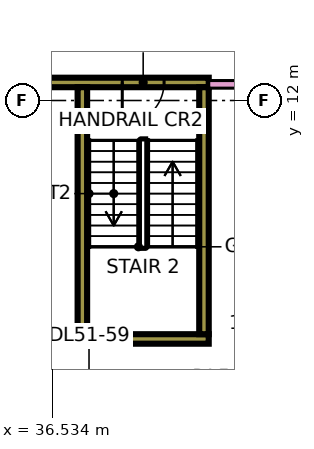
"""IFC4 building model, lengths in metres.
Left out: names, types, materials, properties, quantities, classifications, styles, units other than length and angle.
Written with IfcOpenShell. Run it as: python <this file> out.ifc"""

import sys

from ifc_helpers import new_model, si_unit, direction, frame, frame_2d, origin, place, context, subcontext, project, spatial, rectangle, extrude, element, fill, save


model = new_model("IFC4")
c1 = context("Model", 3, precision=1e-05, world=origin(), true_north=direction((0.0, 1.0)))
c2 = subcontext(c1, "Body", "Model", "MODEL_VIEW")
j1 = project(units=[si_unit("LENGTHUNIT", "METRE"), si_unit("PLANEANGLEUNIT", "RADIAN")], contexts=[c1])
p1 = place(None, origin())
s1 = spatial("IfcSite", under=j1, at=p1, CompositionType="ELEMENT")
p2 = place(p1, origin())
s2 = spatial("IfcBuilding", under=s1, at=p2, CompositionType="ELEMENT")
p3 = place(p2, frame((0.0, 0.0, 219.15)))
s3 = spatial("IfcBuildingStorey", under=s2, at=p3, CompositionType="ELEMENT", Elevation=219.15)
p4 = place(p3, frame((37.2, 5.725, 0.0), z_axis=(0.0, 0.0, 1.0), x_axis=(1.0, 0.0, 0.0)))
e1 = element("IfcWall", 1, at=p4, inside=s3, PredefinedType="SHEAR", context=c2, shape_type="SweptSolid", body=[
    extrude(rectangle(XDim=3.45, YDim=0.25, at=frame_2d((1.725, 0.0))), origin(), (0.0, 0.0, 1.0), 3.75),
])
p5 = place(p3, frame((36.425, 12.475, 0.0), z_axis=(0.0, 0.0, 1.0), x_axis=(1.0, 0.0, 0.0)))
e2 = element("IfcWall", 2, at=p5, inside=s3, PredefinedType="SHEAR", context=c2, shape_type="SweptSolid", body=[
    extrude(rectangle(XDim=4.225, YDim=0.25, at=frame_2d((2.112, 0.0))), origin(), (0.0, 0.0, 1.0), 3.75),
])
p6 = place(p5, frame((1.95, 0.0, 0.0)))
e3 = element("IfcOpeningElement", 3, at=p6, cuts=e2, PredefinedType="OPENING", context=c2, shape_type="SweptSolid", body=[
    extrude(rectangle(XDim=1.1, YDim=2.2, at=frame_2d((0.55, 1.1))), frame((0.0, 0.135, 0.0), z_axis=(0.0, -1.0, 0.0), x_axis=(1.0, 0.0, 0.0)), (0.0, 0.0, 1.0), 0.27),
])
for number, where, z_axis, x_axis in (
    (4, (37.325, 5.85, 0.0), (0.0, 0.0, 1.0), (0.0, 1.0, 0.0)),
    (5, (40.525, 5.85, 0.0), (0.0, 0.0, 1.0), (0.0, 1.0, 0.0)),
):
    element("IfcWall", number, at=place(p3, frame(where, z_axis=z_axis, x_axis=x_axis)), inside=s3, PredefinedType="SHEAR", context=c2, shape_type="SweptSolid", body=[
        extrude(rectangle(XDim=6.5, YDim=0.25, at=frame_2d((3.25, 0.0))), origin(), (0.0, 0.0, 1.0), 3.75),
    ])
p7 = place(p3, frame((40.65, 12.425, 0.0), z_axis=(0.0, 0.0, 1.0), x_axis=(1.0, 0.0, 0.0)))
e6 = element("IfcWall", 6, at=p7, inside=s3, PredefinedType="PARTITIONING", context=c2, shape_type="SweptSolid", body=[
    extrude(rectangle(XDim=22.35, YDim=0.2, at=frame_2d((11.175, 0.0))), origin(), (0.0, 0.0, 1.0), 3.35),
])
p8 = place(p7, frame((14.25, 0.0, 0.0)))
e7 = element("IfcOpeningElement", 7, at=p8, cuts=e6, PredefinedType="OPENING", context=c2, shape_type="SweptSolid", body=[
    extrude(rectangle(XDim=1.0, YDim=2.1, at=frame_2d((0.5, 1.05))), frame((0.0, 0.11, 0.0), z_axis=(0.0, -1.0, 0.0), x_axis=(1.0, 0.0, 0.0)), (0.0, 0.0, 1.0), 0.22),
])
p9 = place(p7, frame((1.05, 0.0, 0.0)))
e8 = element("IfcOpeningElement", 8, at=p9, cuts=e6, PredefinedType="OPENING", context=c2, shape_type="SweptSolid", body=[
    extrude(rectangle(XDim=1.0, YDim=2.1, at=frame_2d((0.5, 1.05))), frame((0.0, 0.11, 0.0), z_axis=(0.0, -1.0, 0.0), x_axis=(1.0, 0.0, 0.0)), (0.0, 0.0, 1.0), 0.22),
])
p10 = place(p6, frame((1.1, 0.0, 0.0), z_axis=(0.0, 0.0, 1.0), x_axis=(-1.0, 0.0, 0.0)))
e9 = element("IfcDoor", 9, at=p10, inside=s3, OperationType="SINGLE_SWING_LEFT", PredefinedType="DOOR", context=c2, shape_type="SweptSolid", body=[
    extrude(rectangle(XDim=1.1, YDim=2.2, at=frame_2d((0.55, 1.1))), frame((0.0, 0.025, 0.0), z_axis=(0.0, -1.0, 0.0), x_axis=(1.0, 0.0, 0.0)), (0.0, 0.0, 1.0), 0.05),
])
fill(e3, e9)
save(model, sys.argv[1])
